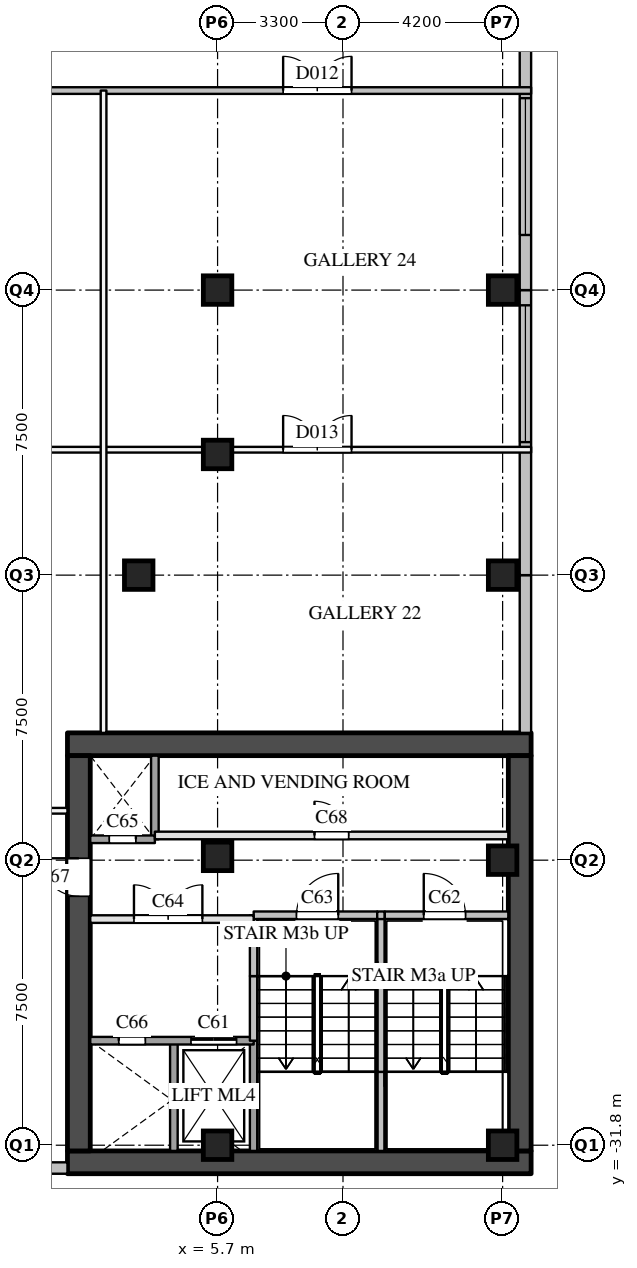
"""IFC4 building model, lengths in metres.
Left out: names, types, materials, properties, quantities, classifications, styles, units other than length and angle.
Written with IfcOpenShell. Run it as: python <this file> out.ifc"""

import sys

from ifc_helpers import new_model, si_unit, direction, frame, frame_2d, origin, origin_2d, place, context, subcontext, project, spatial, rectangle, extrude, element, fill, save


model = new_model("IFC4")
c1 = context("Model", 3, precision=1e-05, world=origin(), true_north=direction((0.0, 1.0)))
c2 = subcontext(c1, "Body", "Model", "MODEL_VIEW")
j1 = project(units=[si_unit("LENGTHUNIT", "METRE"), si_unit("PLANEANGLEUNIT", "RADIAN")], contexts=[c1])
p1 = place(None, origin())
s1 = spatial("IfcSite", under=j1, at=p1, CompositionType="ELEMENT")
p2 = place(p1, origin())
s2 = spatial("IfcBuilding", under=s1, at=p2, CompositionType="ELEMENT")
p3 = place(p2, frame((0.0, 0.0, 21.0)))
s3 = spatial("IfcBuildingStorey", under=s2, at=p3, CompositionType="ELEMENT", Elevation=21.0)
for number, where, z_axis, x_axis in (
    (1, (5.7, -31.8, 0.0), (0.0, 0.0, 1.0), (1.0, 0.0, 0.0)),
    (2, (5.7, -24.2, 0.0), (0.0, 0.0, 1.0), (1.0, 0.0, 0.0)),
    (3, (5.7, -9.3, 0.0), (0.0, 0.0, 1.0), (1.0, 0.0, 0.0)),
    (4, (13.2, -31.8, 0.0), (0.0, 0.0, 1.0), (1.0, 0.0, 0.0)),
    (5, (13.2, -24.3, 0.0), (0.0, 0.0, 1.0), (1.0, 0.0, 0.0)),
    (6, (13.2, -16.8, 0.0), (0.0, 0.0, 1.0), (1.0, 0.0, 0.0)),
    (7, (13.2, -9.3, 0.0), (0.0, 0.0, 1.0), (1.0, 0.0, 0.0)),
    (8, (3.625, -16.8, 0.0), (0.0, 0.0, 1.0), (1.0, 0.0, 0.0)),
    (9, (5.7, -13.625, 0.0), (0.0, 0.0, 1.0), (1.0, 0.0, 0.0)),
):
    element("IfcColumn", number, at=place(p3, frame(where, z_axis=z_axis, x_axis=x_axis)), inside=s3, PredefinedType="COLUMN", context=c2, shape_type="SweptSolid", body=[
        extrude(rectangle(XDim=0.75, YDim=0.75, at=origin_2d()), origin(), (0.0, 0.0, 1.0), 5.0),
    ])
p4 = place(p3, frame((-1.8, -32.4, 0.0), z_axis=(0.0, 0.0, 1.0), x_axis=(1.0, 0.0, 0.0)))
e10 = element("IfcWall", 10, at=p4, inside=s3, PredefinedType="SOLIDWALL", context=c2, shape_type="SweptSolid", body=[
    extrude(rectangle(XDim=3.55, YDim=0.3, at=frame_2d((1.775, 0.0))), origin(), (0.0, 0.0, 1.0), 4.59),
])
p5 = place(p3, frame((13.8, -20.95, 0.0), z_axis=(0.0, 0.0, 1.0), x_axis=(0.0, 1.0, 0.0)))
e11 = element("IfcWall", 11, at=p5, inside=s3, PredefinedType="SOLIDWALL", context=c2, shape_type="SweptSolid", body=[
    extrude(rectangle(XDim=4.15, YDim=0.3, at=frame_2d((2.075, 0.0))), origin(), (0.0, 0.0, 1.0), 4.59),
])
p6 = place(p3, frame((13.8, -16.8, 0.0), z_axis=(0.0, 0.0, 1.0), x_axis=(0.0, 1.0, 0.0)))
e12 = element("IfcWall", 12, at=p6, inside=s3, PredefinedType="SOLIDWALL", context=c2, shape_type="SweptSolid", body=[
    extrude(rectangle(XDim=7.5, YDim=0.3, at=frame_2d((3.75, 0.0))), origin(), (0.0, 0.0, 1.0), 4.59),
])
p7 = place(p6, frame((3.5, 0.0, 2.4)))
e13 = element("IfcOpeningElement", 13, at=p7, cuts=e12, PredefinedType="OPENING", context=c2, shape_type="SweptSolid", body=[
    extrude(rectangle(XDim=3.6, YDim=1.2, at=frame_2d((1.8, 0.6))), frame((0.0, 0.16, 0.0), z_axis=(0.0, -1.0, 0.0), x_axis=(1.0, 0.0, 0.0)), (0.0, 0.0, 1.0), 0.32),
])
p8 = place(p3, frame((13.8, -9.3, 0.0), z_axis=(0.0, 0.0, 1.0), x_axis=(0.0, 1.0, 0.0)))
e14 = element("IfcWall", 14, at=p8, inside=s3, PredefinedType="SOLIDWALL", context=c2, shape_type="SweptSolid", body=[
    extrude(rectangle(XDim=7.5, YDim=0.3, at=frame_2d((3.75, 0.0))), origin(), (0.0, 0.0, 1.0), 4.59),
])
p9 = place(p8, frame((1.45, 0.0, 2.4)))
e15 = element("IfcOpeningElement", 15, at=p9, cuts=e14, PredefinedType="OPENING", context=c2, shape_type="SweptSolid", body=[
    extrude(rectangle(XDim=3.6, YDim=1.2, at=frame_2d((1.8, 0.6))), frame((0.0, 0.16, 0.0), z_axis=(0.0, -1.0, 0.0), x_axis=(1.0, 0.0, 0.0)), (0.0, 0.0, 1.0), 0.32),
])
for number, where, z_axis, x_axis in (
    (16, (1.75, -32.25, 0.0), (0.0, 0.0, 1.0), (1.0, 0.0, 0.0)),
    (17, (1.75, -21.25, 0.0), (0.0, 0.0, 1.0), (1.0, 0.0, 0.0)),
):
    element("IfcWall", number, at=place(p3, frame(where, z_axis=z_axis, x_axis=x_axis)), inside=s3, PredefinedType="SHEAR", context=c2, shape_type="SweptSolid", body=[
        extrude(rectangle(XDim=12.2, YDim=0.6, at=frame_2d((6.1, 0.0))), origin(), (0.0, 0.0, 1.0), 4.55),
    ])
p10 = place(p3, frame((2.05, -31.95, 0.0), z_axis=(0.0, 0.0, 1.0), x_axis=(0.0, 1.0, 0.0)))
e18 = element("IfcWall", 18, at=p10, inside=s3, PredefinedType="SHEAR", context=c2, shape_type="SweptSolid", body=[
    extrude(rectangle(XDim=10.4, YDim=0.6, at=frame_2d((5.2, 0.0))), origin(), (0.0, 0.0, 1.0), 4.55),
])
p11 = place(p10, frame((6.7, 0.0, 0.0)))
e19 = element("IfcOpeningElement", 19, at=p11, cuts=e18, PredefinedType="OPENING", context=c2, shape_type="SweptSolid", body=[
    extrude(rectangle(XDim=1.0, YDim=2.1, at=frame_2d((0.5, 1.05))), frame((0.0, 0.31, 0.0), z_axis=(0.0, -1.0, 0.0), x_axis=(1.0, 0.0, 0.0)), (0.0, 0.0, 1.0), 0.62),
])
p12 = place(p3, frame((13.65, -31.95, 0.0), z_axis=(0.0, 0.0, 1.0), x_axis=(0.0, 1.0, 0.0)))
e20 = element("IfcWall", 20, at=p12, inside=s3, PredefinedType="SHEAR", context=c2, shape_type="SweptSolid", body=[
    extrude(rectangle(XDim=10.4, YDim=0.6, at=frame_2d((5.2, 0.0))), origin(), (0.0, 0.0, 1.0), 4.55),
])
p13 = place(p3, frame((4.05, -23.75, 0.0), z_axis=(0.0, 0.0, 1.0), x_axis=(0.0, 1.0, 0.0)))
e21 = element("IfcWall", 21, at=p13, inside=s3, PredefinedType="SOLIDWALL", context=c2, shape_type="SweptSolid", body=[
    extrude(rectangle(XDim=2.2, YDim=0.2, at=frame_2d((1.1, 0.0))), origin(), (0.0, 0.0, 1.0), 4.55),
])
for number, where, z_axis, x_axis in (
    (22, (4.55, -31.95, 0.0), (0.0, 0.0, 1.0), (0.0, 1.0, 0.0)),
    (23, (6.65, -31.95, 0.0), (0.0, 0.0, 1.0), (0.0, 1.0, 0.0)),
):
    element("IfcWall", number, at=place(p3, frame(where, z_axis=z_axis, x_axis=x_axis)), inside=s3, PredefinedType="SOLIDWALL", context=c2, shape_type="SweptSolid", body=[
        extrude(rectangle(XDim=2.9, YDim=0.2, at=frame_2d((1.45, 0.0))), origin(), (0.0, 0.0, 1.0), 4.55),
    ])
p14 = place(p3, frame((6.65, -29.05, 0.0), z_axis=(0.0, 0.0, 1.0), x_axis=(0.0, 1.0, 0.0)))
e24 = element("IfcWall", 24, at=p14, inside=s3, PredefinedType="SOLIDWALL", context=c2, shape_type="SweptSolid", body=[
    extrude(rectangle(XDim=1.7, YDim=0.2, at=frame_2d((0.85, 0.0))), origin(), (0.0, 0.0, 1.0), 4.55),
])
p15 = place(p3, frame((6.65, -27.35, 0.0), z_axis=(0.0, 0.0, 1.0), x_axis=(0.0, 1.0, 0.0)))
e25 = element("IfcWall", 25, at=p15, inside=s3, PredefinedType="SOLIDWALL", context=c2, shape_type="SweptSolid", body=[
    extrude(rectangle(XDim=1.6, YDim=0.2, at=frame_2d((0.8, 0.0))), origin(), (0.0, 0.0, 1.0), 4.55),
])
p16 = place(p3, frame((10.0, -31.95, 0.0), z_axis=(0.0, 0.0, 1.0), x_axis=(0.0, 1.0, 0.0)))
e26 = element("IfcWall", 26, at=p16, inside=s3, PredefinedType="SOLIDWALL", context=c2, shape_type="SweptSolid", body=[
    extrude(rectangle(XDim=2.08, YDim=0.2, at=frame_2d((1.04, 0.0))), origin(), (0.0, 0.0, 1.0), 4.55),
])
p17 = place(p3, frame((10.0, -29.87, 0.0), z_axis=(0.0, 0.0, 1.0), x_axis=(0.0, 1.0, 0.0)))
e27 = element("IfcWall", 27, at=p17, inside=s3, PredefinedType="SOLIDWALL", context=c2, shape_type="SweptSolid", body=[
    extrude(rectangle(XDim=2.52, YDim=0.2, at=frame_2d((1.26, 0.0))), origin(), (0.0, 0.0, 1.0), 4.55),
])
p18 = place(p3, frame((10.0, -27.35, 0.0), z_axis=(0.0, 0.0, 1.0), x_axis=(0.0, 1.0, 0.0)))
e28 = element("IfcWall", 28, at=p18, inside=s3, PredefinedType="SOLIDWALL", context=c2, shape_type="SweptSolid", body=[
    extrude(rectangle(XDim=1.6, YDim=0.2, at=frame_2d((0.8, 0.0))), origin(), (0.0, 0.0, 1.0), 4.55),
])
p19 = place(p3, frame((2.35, -29.05, 0.0), z_axis=(0.0, 0.0, 1.0), x_axis=(1.0, 0.0, 0.0)))
e29 = element("IfcWall", 29, at=p19, inside=s3, PredefinedType="SOLIDWALL", context=c2, shape_type="SweptSolid", body=[
    extrude(rectangle(XDim=4.3, YDim=0.2, at=frame_2d((2.15, 0.0))), origin(), (0.0, 0.0, 1.0), 4.55),
])
p20 = place(p19, frame((2.65, 0.0, 0.0)))
e30 = element("IfcOpeningElement", 30, at=p20, cuts=e29, PredefinedType="OPENING", context=c2, shape_type="SweptSolid", body=[
    extrude(rectangle(XDim=1.2, YDim=2.1, at=frame_2d((0.6, 1.05))), frame((0.0, 0.11, 0.0), z_axis=(0.0, -1.0, 0.0), x_axis=(1.0, 0.0, 0.0)), (0.0, 0.0, 1.0), 0.22),
])
p21 = place(p19, frame((0.75, 0.0, 0.0)))
e31 = element("IfcOpeningElement", 31, at=p21, cuts=e29, PredefinedType="OPENING", context=c2, shape_type="SweptSolid", body=[
    extrude(rectangle(XDim=0.7, YDim=2.1, at=frame_2d((0.35, 1.05))), frame((0.0, 0.11, 0.0), z_axis=(0.0, -1.0, 0.0), x_axis=(1.0, 0.0, 0.0)), (0.0, 0.0, 1.0), 0.22),
])
p22 = place(p3, frame((2.35, -25.85, 0.0), z_axis=(0.0, 0.0, 1.0), x_axis=(1.0, 0.0, 0.0)))
e32 = element("IfcWall", 32, at=p22, inside=s3, PredefinedType="PARTITIONING", context=c2, shape_type="SweptSolid", body=[
    extrude(rectangle(XDim=4.3, YDim=0.2, at=frame_2d((2.15, 0.0))), origin(), (0.0, 0.0, 1.0), 4.55),
])
p23 = place(p22, frame((1.15, 0.0, 0.0)))
e33 = element("IfcOpeningElement", 33, at=p23, cuts=e32, PredefinedType="OPENING", context=c2, shape_type="SweptSolid", body=[
    extrude(rectangle(XDim=1.8, YDim=2.1, at=frame_2d((0.9, 1.05))), frame((0.0, 0.11, 0.0), z_axis=(0.0, -1.0, 0.0), x_axis=(1.0, 0.0, 0.0)), (0.0, 0.0, 1.0), 0.22),
])
p24 = place(p3, frame((6.65, -25.75, 0.0), z_axis=(0.0, 0.0, 1.0), x_axis=(1.0, 0.0, 0.0)))
e34 = element("IfcWall", 34, at=p24, inside=s3, PredefinedType="SOLIDWALL", context=c2, shape_type="SweptSolid", body=[
    extrude(rectangle(XDim=3.25, YDim=0.2, at=frame_2d((1.625, 0.0))), origin(), (0.0, 0.0, 1.0), 4.55),
])
p25 = place(p24, frame((1.125, 0.0, 0.0)))
e35 = element("IfcOpeningElement", 35, at=p25, cuts=e34, PredefinedType="OPENING", context=c2, shape_type="SweptSolid", body=[
    extrude(rectangle(XDim=1.1, YDim=2.1, at=frame_2d((0.55, 1.05))), frame((0.0, 0.11, 0.0), z_axis=(0.0, -1.0, 0.0), x_axis=(1.0, 0.0, 0.0)), (0.0, 0.0, 1.0), 0.22),
])
p26 = place(p3, frame((9.9, -25.75, 0.0), z_axis=(0.0, 0.0, 1.0), x_axis=(1.0, 0.0, 0.0)))
e36 = element("IfcWall", 36, at=p26, inside=s3, PredefinedType="SOLIDWALL", context=c2, shape_type="SweptSolid", body=[
    extrude(rectangle(XDim=0.2, YDim=0.2, at=frame_2d((0.1, 0.0))), origin(), (0.0, 0.0, 1.0), 4.55),
])
p27 = place(p3, frame((10.1, -25.75, 0.0), z_axis=(0.0, 0.0, 1.0), x_axis=(1.0, 0.0, 0.0)))
e37 = element("IfcWall", 37, at=p27, inside=s3, PredefinedType="SOLIDWALL", context=c2, shape_type="SweptSolid", body=[
    extrude(rectangle(XDim=3.25, YDim=0.2, at=frame_2d((1.625, 0.0))), origin(), (0.0, 0.0, 1.0), 4.55),
])
p28 = place(p27, frame((1.025, 0.0, 0.0)))
e38 = element("IfcOpeningElement", 38, at=p28, cuts=e37, PredefinedType="OPENING", context=c2, shape_type="SweptSolid", body=[
    extrude(rectangle(XDim=1.1, YDim=2.1, at=frame_2d((0.55, 1.05))), frame((0.0, 0.11, 0.0), z_axis=(0.0, -1.0, 0.0), x_axis=(1.0, 0.0, 0.0)), (0.0, 0.0, 1.0), 0.22),
])
p29 = place(p3, frame((4.05, -23.65, 0.0), z_axis=(0.0, 0.0, 1.0), x_axis=(1.0, 0.0, 0.0)))
e39 = element("IfcWall", 39, at=p29, inside=s3, PredefinedType="PARTITIONING", context=c2, shape_type="SweptSolid", body=[
    extrude(rectangle(XDim=9.3, YDim=0.2, at=frame_2d((4.65, 0.0))), origin(), (0.0, 0.0, 1.0), 4.55),
])
p30 = place(p29, frame((4.2, 0.0, 0.0)))
e40 = element("IfcOpeningElement", 40, at=p30, cuts=e39, PredefinedType="OPENING", context=c2, shape_type="SweptSolid", body=[
    extrude(rectangle(XDim=0.9, YDim=2.1, at=frame_2d((0.45, 1.05))), frame((0.0, 0.11, 0.0), z_axis=(0.0, -1.0, 0.0), x_axis=(1.0, 0.0, 0.0)), (0.0, 0.0, 1.0), 0.22),
])
p31 = place(p3, frame((2.35, -23.75, 0.0), z_axis=(0.0, 0.0, 1.0), x_axis=(1.0, 0.0, 0.0)))
e41 = element("IfcWall", 41, at=p31, inside=s3, PredefinedType="SOLIDWALL", context=c2, shape_type="SweptSolid", body=[
    extrude(rectangle(XDim=1.7, YDim=0.2, at=frame_2d((0.85, 0.0))), origin(), (0.0, 0.0, 1.0), 4.55),
])
p32 = place(p31, frame((0.5, 0.0, 0.0)))
e42 = element("IfcOpeningElement", 42, at=p32, cuts=e41, PredefinedType="OPENING", context=c2, shape_type="SweptSolid", body=[
    extrude(rectangle(XDim=0.7, YDim=2.1, at=frame_2d((0.35, 1.05))), frame((0.0, 0.11, 0.0), z_axis=(0.0, -1.0, 0.0), x_axis=(1.0, 0.0, 0.0)), (0.0, 0.0, 1.0), 0.22),
])
p33 = place(p3, frame((-9.3, -4.05, 0.0), z_axis=(0.0, 0.0, 1.0), x_axis=(1.0, 0.0, 0.0)))
e43 = element("IfcWall", 43, at=p33, inside=s3, PredefinedType="PARTITIONING", context=c2, shape_type="SweptSolid", body=[
    extrude(rectangle(XDim=23.25, YDim=0.175, at=frame_2d((11.625, 0.0))), origin(), (0.0, 0.0, 1.0), 3.79),
])
p34 = place(p33, frame((16.725, 0.0, 0.0)))
e44 = element("IfcOpeningElement", 44, at=p34, cuts=e43, PredefinedType="OPENING", context=c2, shape_type="SweptSolid", body=[
    extrude(rectangle(XDim=1.8, YDim=2.1, at=frame_2d((0.9, 1.05))), frame((0.0, 0.097, 0.0), z_axis=(0.0, -1.0, 0.0), x_axis=(1.0, 0.0, 0.0)), (0.0, 0.0, 1.0), 0.195),
])
p35 = place(p3, frame((-9.3, -13.5, 0.0), z_axis=(0.0, 0.0, 1.0), x_axis=(1.0, 0.0, 0.0)))
e45 = element("IfcWall", 45, at=p35, inside=s3, PredefinedType="PARTITIONING", context=c2, shape_type="SweptSolid", body=[
    extrude(rectangle(XDim=23.25, YDim=0.15, at=frame_2d((11.625, 0.0))), origin(), (0.0, 0.0, 1.0), 3.79),
])
p36 = place(p35, frame((5.1, 0.0, 0.0)))
e46 = element("IfcOpeningElement", 46, at=p36, cuts=e45, PredefinedType="OPENING", context=c2, shape_type="SweptSolid", body=[
    extrude(rectangle(XDim=1.8, YDim=2.1, at=frame_2d((0.9, 1.05))), frame((0.0, 0.085, 0.0), z_axis=(0.0, -1.0, 0.0), x_axis=(1.0, 0.0, 0.0)), (0.0, 0.0, 1.0), 0.17),
])
p37 = place(p35, frame((16.725, 0.0, 0.0)))
e47 = element("IfcOpeningElement", 47, at=p37, cuts=e45, PredefinedType="OPENING", context=c2, shape_type="SweptSolid", body=[
    extrude(rectangle(XDim=1.8, YDim=2.1, at=frame_2d((0.9, 1.05))), frame((0.0, 0.085, 0.0), z_axis=(0.0, -1.0, 0.0), x_axis=(1.0, 0.0, 0.0)), (0.0, 0.0, 1.0), 0.17),
])
p38 = place(p3, frame((2.7, -20.95, 0.0), z_axis=(0.0, 0.0, 1.0), x_axis=(0.0, 1.0, 0.0)))
e48 = element("IfcWall", 48, at=p38, inside=s3, PredefinedType="PARTITIONING", context=c2, shape_type="SweptSolid", body=[
    extrude(rectangle(XDim=16.9, YDim=0.15, at=frame_2d((8.45, 0.0))), origin(), (0.0, 0.0, 1.0), 3.79),
])
p39 = place(p3, frame((-9.3, -23.0, 0.0), z_axis=(0.0, 0.0, 1.0), x_axis=(1.0, 0.0, 0.0)))
e49 = element("IfcWall", 49, at=p39, inside=s3, PredefinedType="PARTITIONING", context=c2, shape_type="SweptSolid", body=[
    extrude(rectangle(XDim=11.05, YDim=0.15, at=frame_2d((5.525, 0.0))), origin(), (0.0, 0.0, 1.0), 3.79),
])
p40 = place(p39, frame((5.025, 0.0, 0.0)))
e50 = element("IfcOpeningElement", 50, at=p40, cuts=e49, PredefinedType="OPENING", context=c2, shape_type="SweptSolid", body=[
    extrude(rectangle(XDim=1.0, YDim=2.1, at=frame_2d((0.5, 1.05))), frame((0.0, 0.085, 0.0), z_axis=(0.0, -1.0, 0.0), x_axis=(1.0, 0.0, 0.0)), (0.0, 0.0, 1.0), 0.17),
])
p41 = place(p7, origin())
e51 = element("IfcWindow", 51, at=p41, inside=s3, PartitioningType="SINGLE_PANEL", PredefinedType="WINDOW", context=c2, shape_type="SweptSolid", body=[
    extrude(rectangle(XDim=3.6, YDim=1.2, at=frame_2d((1.8, 0.6))), frame((0.0, 0.03, 0.0), z_axis=(0.0, -1.0, 0.0), x_axis=(1.0, 0.0, 0.0)), (0.0, 0.0, 1.0), 0.06),
])
fill(e13, e51)
p42 = place(p9, origin())
e52 = element("IfcWindow", 52, at=p42, inside=s3, PartitioningType="SINGLE_PANEL", PredefinedType="WINDOW", context=c2, shape_type="SweptSolid", body=[
    extrude(rectangle(XDim=3.6, YDim=1.2, at=frame_2d((1.8, 0.6))), frame((0.0, 0.03, 0.0), z_axis=(0.0, -1.0, 0.0), x_axis=(1.0, 0.0, 0.0)), (0.0, 0.0, 1.0), 0.06),
])
fill(e15, e52)
p43 = place(p20, origin())
e53 = element("IfcDoor", 53, at=p43, inside=s3, OperationType="SLIDING_TO_LEFT", PredefinedType="DOOR", context=c2, shape_type="SweptSolid", body=[
    extrude(rectangle(XDim=1.2, YDim=2.1, at=frame_2d((0.6, 1.05))), frame((0.0, 0.025, 0.0), z_axis=(0.0, -1.0, 0.0), x_axis=(1.0, 0.0, 0.0)), (0.0, 0.0, 1.0), 0.05),
])
fill(e30, e53)
p44 = place(p28, origin())
e54 = element("IfcDoor", 54, at=p44, inside=s3, OperationType="SINGLE_SWING_LEFT", PredefinedType="DOOR", context=c2, shape_type="SweptSolid", body=[
    extrude(rectangle(XDim=1.1, YDim=2.1, at=frame_2d((0.55, 1.05))), frame((0.0, 0.025, 0.0), z_axis=(0.0, -1.0, 0.0), x_axis=(1.0, 0.0, 0.0)), (0.0, 0.0, 1.0), 0.05),
])
fill(e38, e54)
p45 = place(p25, origin())
e55 = element("IfcDoor", 55, at=p45, inside=s3, OperationType="SINGLE_SWING_RIGHT", PredefinedType="DOOR", context=c2, shape_type="SweptSolid", body=[
    extrude(rectangle(XDim=1.1, YDim=2.1, at=frame_2d((0.55, 1.05))), frame((0.0, 0.025, 0.0), z_axis=(0.0, -1.0, 0.0), x_axis=(1.0, 0.0, 0.0)), (0.0, 0.0, 1.0), 0.05),
])
fill(e35, e55)
p46 = place(p23, origin())
e56 = element("IfcDoor", 56, at=p46, inside=s3, OperationType="DOUBLE_DOOR_SINGLE_SWING", PredefinedType="DOOR", context=c2, shape_type="SweptSolid", body=[
    extrude(rectangle(XDim=1.8, YDim=2.1, at=frame_2d((0.9, 1.05))), frame((0.0, 0.025, 0.0), z_axis=(0.0, -1.0, 0.0), x_axis=(1.0, 0.0, 0.0)), (0.0, 0.0, 1.0), 0.05),
])
fill(e33, e56)
p47 = place(p32, origin())
e57 = element("IfcDoor", 57, at=p47, inside=s3, OperationType="SINGLE_SWING_RIGHT", PredefinedType="DOOR", context=c2, shape_type="SweptSolid", body=[
    extrude(rectangle(XDim=0.7, YDim=2.1, at=frame_2d((0.35, 1.05))), frame((0.0, 0.025, 0.0), z_axis=(0.0, -1.0, 0.0), x_axis=(1.0, 0.0, 0.0)), (0.0, 0.0, 1.0), 0.05),
])
fill(e42, e57)
p48 = place(p21, origin())
e58 = element("IfcDoor", 58, at=p48, inside=s3, OperationType="SINGLE_SWING_LEFT", PredefinedType="DOOR", context=c2, shape_type="SweptSolid", body=[
    extrude(rectangle(XDim=0.7, YDim=2.1, at=frame_2d((0.35, 1.05))), frame((0.0, 0.025, 0.0), z_axis=(0.0, -1.0, 0.0), x_axis=(1.0, 0.0, 0.0)), (0.0, 0.0, 1.0), 0.05),
])
fill(e31, e58)
p49 = place(p11, origin())
e59 = element("IfcDoor", 59, at=p49, inside=s3, OperationType="SINGLE_SWING_RIGHT", PredefinedType="DOOR", context=c2, shape_type="SweptSolid", body=[
    extrude(rectangle(XDim=1.0, YDim=2.1, at=frame_2d((0.5, 1.05))), frame((0.0, 0.025, 0.0), z_axis=(0.0, -1.0, 0.0), x_axis=(1.0, 0.0, 0.0)), (0.0, 0.0, 1.0), 0.05),
])
fill(e19, e59)
p50 = place(p30, origin())
e60 = element("IfcDoor", 60, at=p50, inside=s3, OperationType="SINGLE_SWING_LEFT", PredefinedType="DOOR", context=c2, shape_type="SweptSolid", body=[
    extrude(rectangle(XDim=0.9, YDim=2.1, at=frame_2d((0.45, 1.05))), frame((0.0, 0.025, 0.0), z_axis=(0.0, -1.0, 0.0), x_axis=(1.0, 0.0, 0.0)), (0.0, 0.0, 1.0), 0.05),
])
fill(e40, e60)
p51 = place(p34, origin())
e61 = element("IfcDoor", 61, at=p51, inside=s3, OperationType="DOUBLE_DOOR_SINGLE_SWING", PredefinedType="DOOR", context=c2, shape_type="SweptSolid", body=[
    extrude(rectangle(XDim=1.8, YDim=2.1, at=frame_2d((0.9, 1.05))), frame((0.0, 0.025, 0.0), z_axis=(0.0, -1.0, 0.0), x_axis=(1.0, 0.0, 0.0)), (0.0, 0.0, 1.0), 0.05),
])
fill(e44, e61)
p52 = place(p37, origin())
e62 = element("IfcDoor", 62, at=p52, inside=s3, OperationType="DOUBLE_DOOR_SINGLE_SWING", PredefinedType="DOOR", context=c2, shape_type="SweptSolid", body=[
    extrude(rectangle(XDim=1.8, YDim=2.1, at=frame_2d((0.9, 1.05))), frame((0.0, 0.025, 0.0), z_axis=(0.0, -1.0, 0.0), x_axis=(1.0, 0.0, 0.0)), (0.0, 0.0, 1.0), 0.05),
])
fill(e47, e62)
save(model, sys.argv[1])
